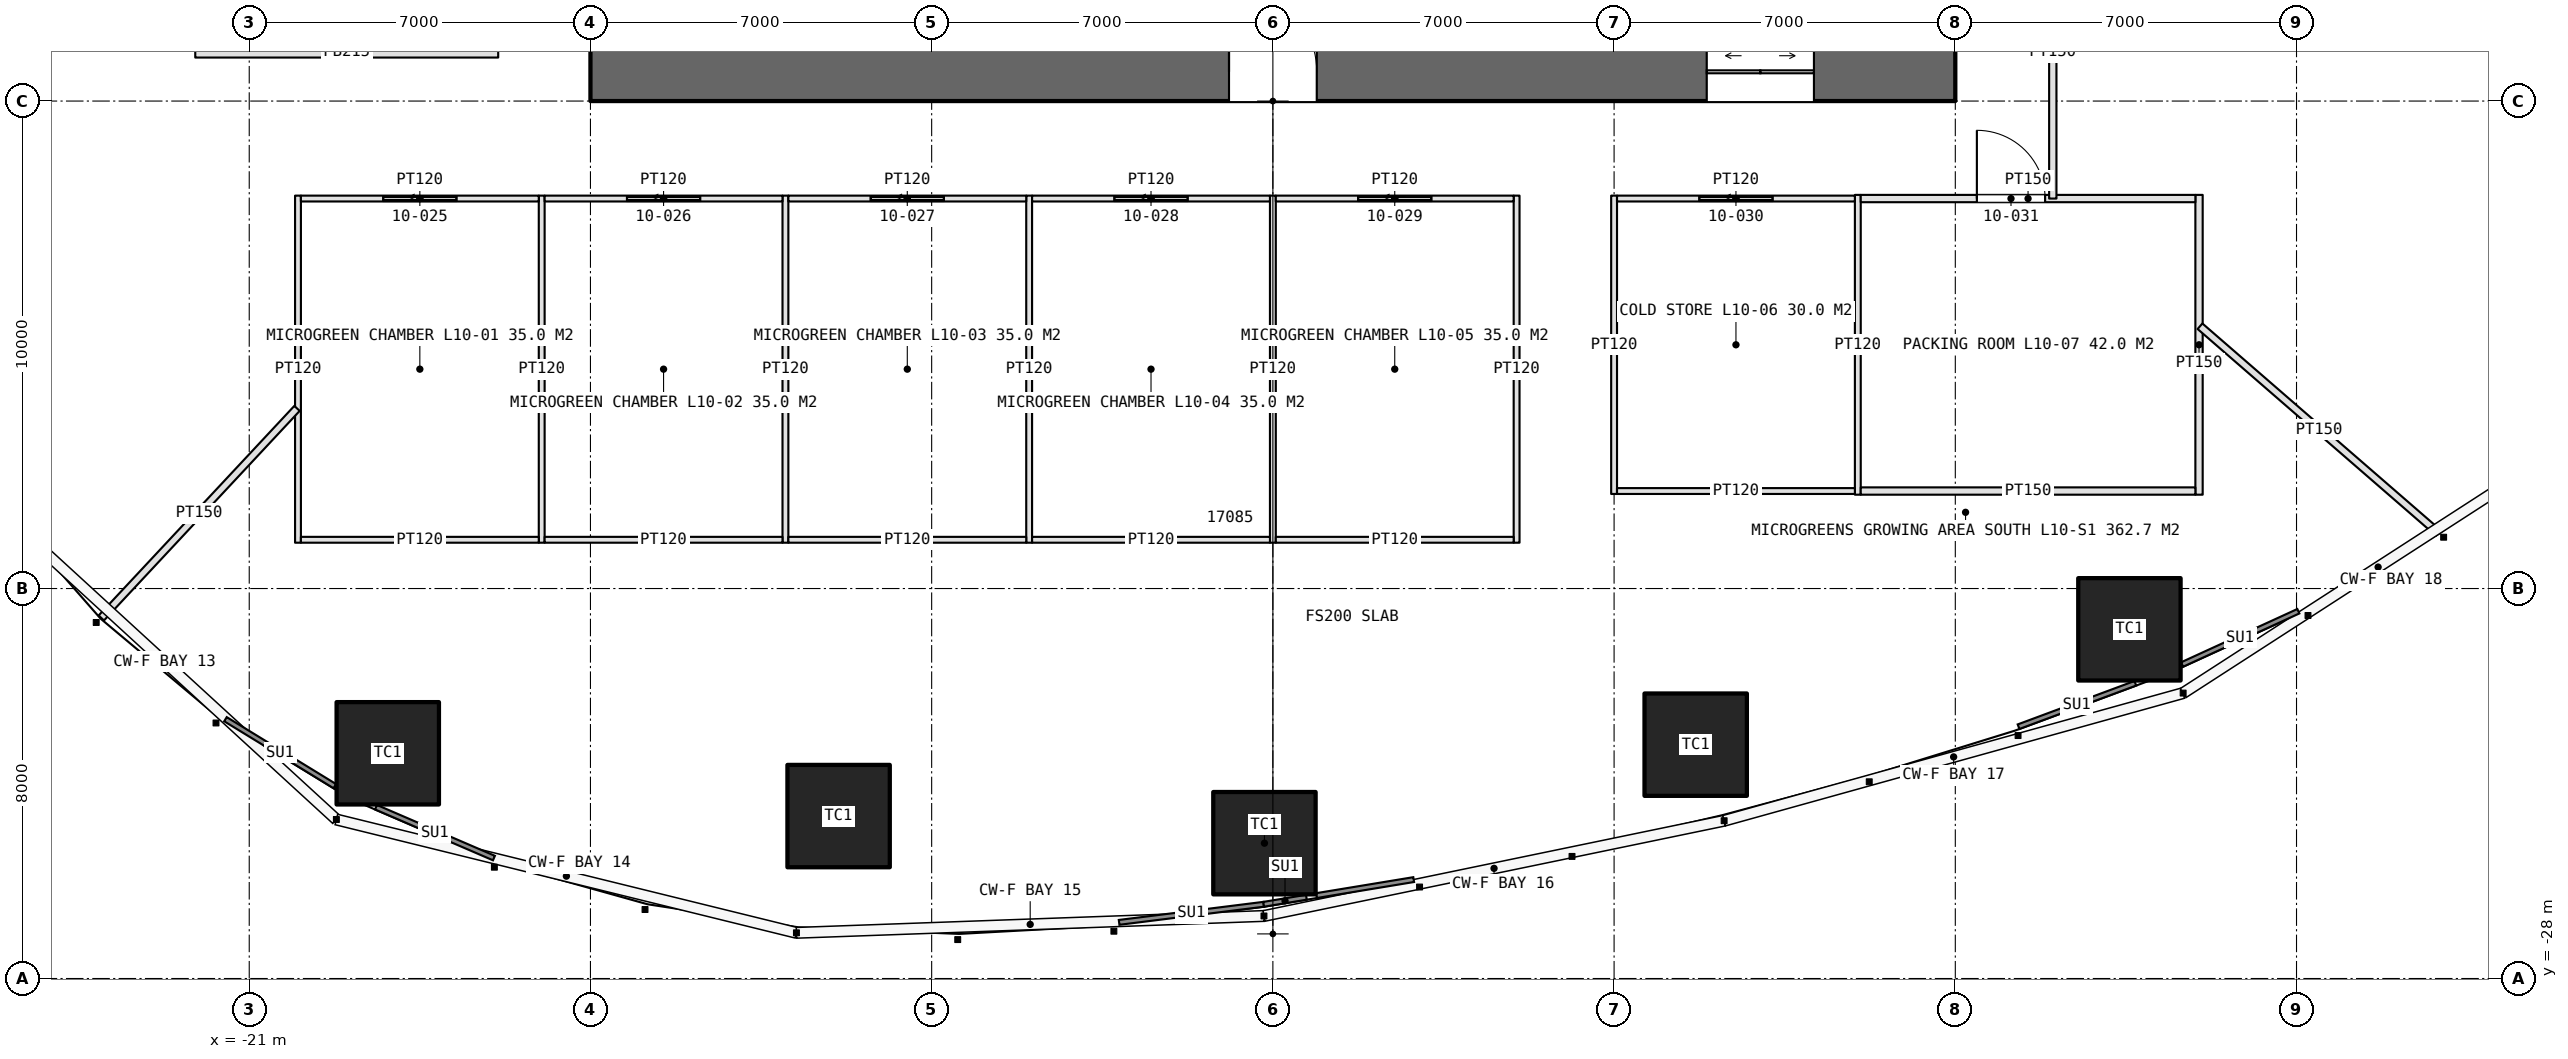
"""IFC4 building model, lengths in metres.
Left out: names, types, materials, properties, quantities, classifications, styles, units other than length and angle.
Written with IfcOpenShell. Run it as: python <this file> out.ifc"""

import sys

from ifc_helpers import new_model, si_unit, direction, frame, frame_2d, origin, origin_2d, place, context, subcontext, project, spatial, rectangle, extrude, element, fill, save


model = new_model("IFC4")
c1 = context("Model", 3, precision=1e-05, world=origin(), true_north=direction((0.0, 1.0)))
c2 = subcontext(c1, "Body", "Model", "MODEL_VIEW")
j1 = project(units=[si_unit("LENGTHUNIT", "METRE"), si_unit("PLANEANGLEUNIT", "RADIAN")], contexts=[c1])
p1 = place(None, origin())
s1 = spatial("IfcSite", under=j1, at=p1, CompositionType="ELEMENT")
p2 = place(p1, origin())
s2 = spatial("IfcBuilding", under=s1, at=p2, CompositionType="ELEMENT")
p3 = place(p2, frame((0.0, 0.0, 50.0)))
s3 = spatial("IfcBuildingStorey", under=s2, at=p3, CompositionType="ELEMENT", Elevation=50.0)
p4 = place(p3, frame((-14.0, -9.4, 0.0), z_axis=(0.0, 0.0, 1.0), x_axis=(1.0, 0.0, 0.0)))
e1 = element("IfcWall", 1, at=p4, inside=s3, PredefinedType="SHEAR", context=c2, shape_type="SweptSolid", body=[
    extrude(rectangle(XDim=28.0, YDim=1.2, at=frame_2d((14.0, 0.0))), origin(), (0.0, 0.0, 1.0), 5.0),
])
p5 = place(p4, frame((13.1, 0.0, 0.0)))
e2 = element("IfcOpeningElement", 2, at=p5, cuts=e1, PredefinedType="OPENING", context=c2, shape_type="SweptSolid", body=[
    extrude(rectangle(XDim=1.8, YDim=2.4, at=frame_2d((0.9, 1.2))), frame((0.0, 0.61, 0.0), z_axis=(0.0, -1.0, 0.0), x_axis=(1.0, 0.0, 0.0)), (0.0, 0.0, 1.0), 1.22),
])
p6 = place(p4, frame((22.9, 0.0, 0.0)))
e3 = element("IfcOpeningElement", 3, at=p6, cuts=e1, PredefinedType="OPENING", context=c2, shape_type="SweptSolid", body=[
    extrude(rectangle(XDim=2.2, YDim=2.7, at=frame_2d((1.1, 1.35))), frame((0.0, 0.61, 0.0), z_axis=(0.0, -1.0, 0.0), x_axis=(1.0, 0.0, 0.0)), (0.0, 0.0, 1.0), 1.22),
])
for number, where, z_axis, x_axis in (
    (4, (-18.158, -23.38, 0.0), (0.0, 0.0, 1.0), (1.0, 0.0, 0.0)),
    (5, (-8.909, -24.668, 0.0), (0.0, 0.0, 1.0), (1.0, 0.0, 0.0)),
    (6, (-0.173, -25.224, 0.0), (0.0, 0.0, 1.0), (1.0, 0.0, 0.0)),
    (7, (8.674, -23.203, 0.0), (0.0, 0.0, 1.0), (1.0, 0.0, 0.0)),
    (8, (17.572, -20.837, 0.0), (0.0, 0.0, 1.0), (1.0, 0.0, 0.0)),
):
    element("IfcColumn", number, at=place(p3, frame(where, z_axis=z_axis, x_axis=x_axis)), inside=s3, PredefinedType="COLUMN", context=c2, shape_type="SweptSolid", body=[
        extrude(rectangle(XDim=2.1, YDim=2.1, at=origin_2d()), origin(), (0.0, 0.0, 1.0), 5.0),
    ])
for number, where, z_axis, x_axis in (
    (9, (-20.0, -11.94, 0.0), (0.0, 0.0, 1.0), (0.0, -1.0, 0.0)),
    (10, (-15.0, -11.94, 0.0), (0.0, 0.0, 1.0), (0.0, -1.0, 0.0)),
    (11, (-10.0, -11.94, 0.0), (0.0, 0.0, 1.0), (0.0, -1.0, 0.0)),
    (12, (-5.0, -11.94, 0.0), (0.0, 0.0, 1.0), (0.0, -1.0, 0.0)),
    (13, (0.0, -11.94, 0.0), (0.0, 0.0, 1.0), (0.0, -1.0, 0.0)),
    (14, (5.0, -11.94, 0.0), (0.0, 0.0, 1.0), (0.0, -1.0, 0.0)),
):
    element("IfcWall", number, at=place(p3, frame(where, z_axis=z_axis, x_axis=x_axis)), inside=s3, PredefinedType="PARTITIONING", context=c2, shape_type="SweptSolid", body=[
        extrude(rectangle(XDim=7.12, YDim=0.12, at=frame_2d((3.56, 0.0))), origin(), (0.0, 0.0, 1.0), 3.6),
    ])
p7 = place(p3, frame((-19.94, -12.0, 0.0), z_axis=(0.0, 0.0, 1.0), x_axis=(1.0, 0.0, 0.0)))
e15 = element("IfcWall", 15, at=p7, inside=s3, PredefinedType="PARTITIONING", context=c2, shape_type="SweptSolid", body=[
    extrude(rectangle(XDim=4.88, YDim=0.12, at=frame_2d((2.44, 0.0))), origin(), (0.0, 0.0, 1.0), 3.6),
])
p8 = place(p7, frame((1.69, 0.0, 0.0)))
e16 = element("IfcOpeningElement", 16, at=p8, cuts=e15, PredefinedType="OPENING", context=c2, shape_type="SweptSolid", body=[
    extrude(rectangle(XDim=1.5, YDim=2.5, at=frame_2d((0.75, 1.25))), frame((0.0, 0.07, 0.0), z_axis=(0.0, -1.0, 0.0), x_axis=(1.0, 0.0, 0.0)), (0.0, 0.0, 1.0), 0.14),
])
p9 = place(p3, frame((-19.94, -19.0, 0.0), z_axis=(0.0, 0.0, 1.0), x_axis=(1.0, 0.0, 0.0)))
e17 = element("IfcWall", 17, at=p9, inside=s3, PredefinedType="PARTITIONING", context=c2, shape_type="SweptSolid", body=[
    extrude(rectangle(XDim=4.88, YDim=0.12, at=frame_2d((2.44, 0.0))), origin(), (0.0, 0.0, 1.0), 3.6),
])
p10 = place(p3, frame((-14.94, -12.0, 0.0), z_axis=(0.0, 0.0, 1.0), x_axis=(1.0, 0.0, 0.0)))
e18 = element("IfcWall", 18, at=p10, inside=s3, PredefinedType="PARTITIONING", context=c2, shape_type="SweptSolid", body=[
    extrude(rectangle(XDim=4.88, YDim=0.12, at=frame_2d((2.44, 0.0))), origin(), (0.0, 0.0, 1.0), 3.6),
])
p11 = place(p10, frame((1.69, 0.0, 0.0)))
e19 = element("IfcOpeningElement", 19, at=p11, cuts=e18, PredefinedType="OPENING", context=c2, shape_type="SweptSolid", body=[
    extrude(rectangle(XDim=1.5, YDim=2.5, at=frame_2d((0.75, 1.25))), frame((0.0, 0.07, 0.0), z_axis=(0.0, -1.0, 0.0), x_axis=(1.0, 0.0, 0.0)), (0.0, 0.0, 1.0), 0.14),
])
p12 = place(p3, frame((-14.94, -19.0, 0.0), z_axis=(0.0, 0.0, 1.0), x_axis=(1.0, 0.0, 0.0)))
e20 = element("IfcWall", 20, at=p12, inside=s3, PredefinedType="PARTITIONING", context=c2, shape_type="SweptSolid", body=[
    extrude(rectangle(XDim=4.88, YDim=0.12, at=frame_2d((2.44, 0.0))), origin(), (0.0, 0.0, 1.0), 3.6),
])
p13 = place(p3, frame((-9.94, -12.0, 0.0), z_axis=(0.0, 0.0, 1.0), x_axis=(1.0, 0.0, 0.0)))
e21 = element("IfcWall", 21, at=p13, inside=s3, PredefinedType="PARTITIONING", context=c2, shape_type="SweptSolid", body=[
    extrude(rectangle(XDim=4.88, YDim=0.12, at=frame_2d((2.44, 0.0))), origin(), (0.0, 0.0, 1.0), 3.6),
])
p14 = place(p13, frame((1.69, 0.0, 0.0)))
e22 = element("IfcOpeningElement", 22, at=p14, cuts=e21, PredefinedType="OPENING", context=c2, shape_type="SweptSolid", body=[
    extrude(rectangle(XDim=1.5, YDim=2.5, at=frame_2d((0.75, 1.25))), frame((0.0, 0.07, 0.0), z_axis=(0.0, -1.0, 0.0), x_axis=(1.0, 0.0, 0.0)), (0.0, 0.0, 1.0), 0.14),
])
p15 = place(p3, frame((-9.94, -19.0, 0.0), z_axis=(0.0, 0.0, 1.0), x_axis=(1.0, 0.0, 0.0)))
e23 = element("IfcWall", 23, at=p15, inside=s3, PredefinedType="PARTITIONING", context=c2, shape_type="SweptSolid", body=[
    extrude(rectangle(XDim=4.88, YDim=0.12, at=frame_2d((2.44, 0.0))), origin(), (0.0, 0.0, 1.0), 3.6),
])
p16 = place(p3, frame((-4.94, -12.0, 0.0), z_axis=(0.0, 0.0, 1.0), x_axis=(1.0, 0.0, 0.0)))
e24 = element("IfcWall", 24, at=p16, inside=s3, PredefinedType="PARTITIONING", context=c2, shape_type="SweptSolid", body=[
    extrude(rectangle(XDim=4.88, YDim=0.12, at=frame_2d((2.44, 0.0))), origin(), (0.0, 0.0, 1.0), 3.6),
])
p17 = place(p16, frame((1.69, 0.0, 0.0)))
e25 = element("IfcOpeningElement", 25, at=p17, cuts=e24, PredefinedType="OPENING", context=c2, shape_type="SweptSolid", body=[
    extrude(rectangle(XDim=1.5, YDim=2.5, at=frame_2d((0.75, 1.25))), frame((0.0, 0.07, 0.0), z_axis=(0.0, -1.0, 0.0), x_axis=(1.0, 0.0, 0.0)), (0.0, 0.0, 1.0), 0.14),
])
p18 = place(p3, frame((-4.94, -19.0, 0.0), z_axis=(0.0, 0.0, 1.0), x_axis=(1.0, 0.0, 0.0)))
e26 = element("IfcWall", 26, at=p18, inside=s3, PredefinedType="PARTITIONING", context=c2, shape_type="SweptSolid", body=[
    extrude(rectangle(XDim=4.88, YDim=0.12, at=frame_2d((2.44, 0.0))), origin(), (0.0, 0.0, 1.0), 3.6),
])
p19 = place(p3, frame((0.06, -12.0, 0.0), z_axis=(0.0, 0.0, 1.0), x_axis=(1.0, 0.0, 0.0)))
e27 = element("IfcWall", 27, at=p19, inside=s3, PredefinedType="PARTITIONING", context=c2, shape_type="SweptSolid", body=[
    extrude(rectangle(XDim=4.88, YDim=0.12, at=frame_2d((2.44, 0.0))), origin(), (0.0, 0.0, 1.0), 3.6),
])
p20 = place(p19, frame((1.69, 0.0, 0.0)))
e28 = element("IfcOpeningElement", 28, at=p20, cuts=e27, PredefinedType="OPENING", context=c2, shape_type="SweptSolid", body=[
    extrude(rectangle(XDim=1.5, YDim=2.5, at=frame_2d((0.75, 1.25))), frame((0.0, 0.07, 0.0), z_axis=(0.0, -1.0, 0.0), x_axis=(1.0, 0.0, 0.0)), (0.0, 0.0, 1.0), 0.14),
])
p21 = place(p3, frame((0.06, -19.0, 0.0), z_axis=(0.0, 0.0, 1.0), x_axis=(1.0, 0.0, 0.0)))
e29 = element("IfcWall", 29, at=p21, inside=s3, PredefinedType="PARTITIONING", context=c2, shape_type="SweptSolid", body=[
    extrude(rectangle(XDim=4.88, YDim=0.12, at=frame_2d((2.44, 0.0))), origin(), (0.0, 0.0, 1.0), 3.6),
])
p22 = place(p3, frame((7.0, -11.94, 0.0), z_axis=(0.0, 0.0, 1.0), x_axis=(0.0, -1.0, 0.0)))
e30 = element("IfcWall", 30, at=p22, inside=s3, PredefinedType="PARTITIONING", context=c2, shape_type="SweptSolid", body=[
    extrude(rectangle(XDim=6.12, YDim=0.12, at=frame_2d((3.06, 0.0))), origin(), (0.0, 0.0, 1.0), 3.6),
])
p23 = place(p3, frame((12.0, -11.925, 0.0), z_axis=(0.0, 0.0, 1.0), x_axis=(0.0, -1.0, 0.0)))
e31 = element("IfcWall", 31, at=p23, inside=s3, PredefinedType="PARTITIONING", context=c2, shape_type="SweptSolid", body=[
    extrude(rectangle(XDim=6.15, YDim=0.12, at=frame_2d((3.075, 0.0))), origin(), (0.0, 0.0, 1.0), 3.6),
])
p24 = place(p3, frame((19.0, -11.925, 0.0), z_axis=(0.0, 0.0, 1.0), x_axis=(0.0, -1.0, 0.0)))
e32 = element("IfcWall", 32, at=p24, inside=s3, PredefinedType="PARTITIONING", context=c2, shape_type="SweptSolid", body=[
    extrude(rectangle(XDim=6.15, YDim=0.15, at=frame_2d((3.075, 0.0))), origin(), (0.0, 0.0, 1.0), 3.6),
])
p25 = place(p3, frame((7.06, -12.0, 0.0), z_axis=(0.0, 0.0, 1.0), x_axis=(1.0, 0.0, 0.0)))
e33 = element("IfcWall", 33, at=p25, inside=s3, PredefinedType="PARTITIONING", context=c2, shape_type="SweptSolid", body=[
    extrude(rectangle(XDim=4.88, YDim=0.12, at=frame_2d((2.44, 0.0))), origin(), (0.0, 0.0, 1.0), 3.6),
])
p26 = place(p25, frame((1.69, 0.0, 0.0)))
e34 = element("IfcOpeningElement", 34, at=p26, cuts=e33, PredefinedType="OPENING", context=c2, shape_type="SweptSolid", body=[
    extrude(rectangle(XDim=1.5, YDim=2.5, at=frame_2d((0.75, 1.25))), frame((0.0, 0.07, 0.0), z_axis=(0.0, -1.0, 0.0), x_axis=(1.0, 0.0, 0.0)), (0.0, 0.0, 1.0), 0.14),
])
p27 = place(p3, frame((7.06, -18.0, 0.0), z_axis=(0.0, 0.0, 1.0), x_axis=(1.0, 0.0, 0.0)))
e35 = element("IfcWall", 35, at=p27, inside=s3, PredefinedType="PARTITIONING", context=c2, shape_type="SweptSolid", body=[
    extrude(rectangle(XDim=4.88, YDim=0.12, at=frame_2d((2.44, 0.0))), origin(), (0.0, 0.0, 1.0), 3.6),
])
p28 = place(p3, frame((12.06, -12.0, 0.0), z_axis=(0.0, 0.0, 1.0), x_axis=(1.0, 0.0, 0.0)))
e36 = element("IfcWall", 36, at=p28, inside=s3, PredefinedType="PARTITIONING", context=c2, shape_type="SweptSolid", body=[
    extrude(rectangle(XDim=6.865, YDim=0.15, at=frame_2d((3.433, 0.0))), origin(), (0.0, 0.0, 1.0), 3.6),
])
p29 = place(p28, frame((2.383, 0.0, 0.0)))
e37 = element("IfcOpeningElement", 37, at=p29, cuts=e36, PredefinedType="OPENING", context=c2, shape_type="SweptSolid", body=[
    extrude(rectangle(XDim=1.4, YDim=2.4, at=frame_2d((0.7, 1.2))), frame((0.0, 0.085, 0.0), z_axis=(0.0, -1.0, 0.0), x_axis=(1.0, 0.0, 0.0)), (0.0, 0.0, 1.0), 0.17),
])
p30 = place(p3, frame((12.06, -18.0, 0.0), z_axis=(0.0, 0.0, 1.0), x_axis=(1.0, 0.0, 0.0)))
e38 = element("IfcWall", 38, at=p30, inside=s3, PredefinedType="PARTITIONING", context=c2, shape_type="SweptSolid", body=[
    extrude(rectangle(XDim=6.865, YDim=0.15, at=frame_2d((3.433, 0.0))), origin(), (0.0, 0.0, 1.0), 3.6),
])
p31 = place(p3, frame((-15.893, -9.0, 0.0), z_axis=(0.0, 0.0, 1.0), x_axis=(-1.0, 0.0, 0.0)))
e39 = element("IfcWall", 39, at=p31, inside=s3, PredefinedType="PARTITIONING", context=c2, shape_type="SweptSolid", body=[
    extrude(rectangle(XDim=6.215, YDim=0.215, at=frame_2d((3.107, 0.0))), origin(), (0.0, 0.0, 1.0), 3.6),
])
p32 = place(p3, frame((-20.02, -16.305, 0.0), z_axis=(0.0, 0.0, 1.0), x_axis=(-0.682516386928, -0.730870290527, 0.0)))
e40 = element("IfcWall", 40, at=p32, inside=s3, PredefinedType="PARTITIONING", context=c2, shape_type="SweptSolid", body=[
    extrude(rectangle(XDim=5.882, YDim=0.15, at=frame_2d((2.941, 0.0))), origin(), (0.0, 0.0, 1.0), 3.6),
])
p33 = place(p3, frame((19.02, -14.619, 0.0), z_axis=(0.0, 0.0, 1.0), x_axis=(0.755435065004, -0.65522352107, 0.0)))
e41 = element("IfcWall", 41, at=p33, inside=s3, PredefinedType="PARTITIONING", context=c2, shape_type="SweptSolid", body=[
    extrude(rectangle(XDim=6.471, YDim=0.15, at=frame_2d((3.235, 0.0))), origin(), (0.0, 0.0, 1.0), 3.6),
])
p34 = place(p3, frame((16.0, -12.0, 0.0), z_axis=(0.0, 0.0, 1.0), x_axis=(0.0, 1.0, 0.0)))
e42 = element("IfcWall", 42, at=p34, inside=s3, PredefinedType="PARTITIONING", context=c2, shape_type="SweptSolid", body=[
    extrude(rectangle(XDim=6.0, YDim=0.15, at=frame_2d((3.0, 0.0))), origin(), (0.0, 0.0, 1.0), 3.6),
])
p35 = place(p34, frame((3.9, 0.0, 0.0)))
e43 = element("IfcOpeningElement", 43, at=p35, cuts=e42, PredefinedType="OPENING", context=c2, shape_type="SweptSolid", body=[
    extrude(rectangle(XDim=1.6, YDim=2.4, at=frame_2d((0.8, 1.2))), frame((0.0, 0.085, 0.0), z_axis=(0.0, -1.0, 0.0), x_axis=(1.0, 0.0, 0.0)), (0.0, 0.0, 1.0), 0.17),
])
p36 = place(p5, origin())
e44 = element("IfcDoor", 44, at=p36, inside=s3, OperationType="DOUBLE_DOOR_SINGLE_SWING", PredefinedType="DOOR", context=c2, shape_type="SweptSolid", body=[
    extrude(rectangle(XDim=1.8, YDim=2.4, at=frame_2d((0.9, 1.2))), frame((0.0, 0.025, 0.0), z_axis=(0.0, -1.0, 0.0), x_axis=(1.0, 0.0, 0.0)), (0.0, 0.0, 1.0), 0.05),
])
fill(e2, e44)
p37 = place(p6, origin())
e45 = element("IfcDoor", 45, at=p37, inside=s3, OperationType="DOUBLE_DOOR_SLIDING", PredefinedType="DOOR", context=c2, shape_type="SweptSolid", body=[
    extrude(rectangle(XDim=2.2, YDim=2.7, at=frame_2d((1.1, 1.35))), frame((0.0, 0.025, 0.0), z_axis=(0.0, -1.0, 0.0), x_axis=(1.0, 0.0, 0.0)), (0.0, 0.0, 1.0), 0.05),
])
fill(e3, e45)
p38 = place(p8, origin())
e46 = element("IfcDoor", 46, at=p38, inside=s3, OperationType="SLIDING_TO_LEFT", PredefinedType="DOOR", context=c2, shape_type="SweptSolid", body=[
    extrude(rectangle(XDim=1.5, YDim=2.5, at=frame_2d((0.75, 1.25))), frame((0.0, 0.025, 0.0), z_axis=(0.0, -1.0, 0.0), x_axis=(1.0, 0.0, 0.0)), (0.0, 0.0, 1.0), 0.05),
])
fill(e16, e46)
p39 = place(p11, origin())
e47 = element("IfcDoor", 47, at=p39, inside=s3, OperationType="SLIDING_TO_LEFT", PredefinedType="DOOR", context=c2, shape_type="SweptSolid", body=[
    extrude(rectangle(XDim=1.5, YDim=2.5, at=frame_2d((0.75, 1.25))), frame((0.0, 0.025, 0.0), z_axis=(0.0, -1.0, 0.0), x_axis=(1.0, 0.0, 0.0)), (0.0, 0.0, 1.0), 0.05),
])
fill(e19, e47)
p40 = place(p14, origin())
e48 = element("IfcDoor", 48, at=p40, inside=s3, OperationType="SLIDING_TO_LEFT", PredefinedType="DOOR", context=c2, shape_type="SweptSolid", body=[
    extrude(rectangle(XDim=1.5, YDim=2.5, at=frame_2d((0.75, 1.25))), frame((0.0, 0.025, 0.0), z_axis=(0.0, -1.0, 0.0), x_axis=(1.0, 0.0, 0.0)), (0.0, 0.0, 1.0), 0.05),
])
fill(e22, e48)
p41 = place(p17, origin())
e49 = element("IfcDoor", 49, at=p41, inside=s3, OperationType="SLIDING_TO_LEFT", PredefinedType="DOOR", context=c2, shape_type="SweptSolid", body=[
    extrude(rectangle(XDim=1.5, YDim=2.5, at=frame_2d((0.75, 1.25))), frame((0.0, 0.025, 0.0), z_axis=(0.0, -1.0, 0.0), x_axis=(1.0, 0.0, 0.0)), (0.0, 0.0, 1.0), 0.05),
])
fill(e25, e49)
p42 = place(p20, origin())
e50 = element("IfcDoor", 50, at=p42, inside=s3, OperationType="SLIDING_TO_LEFT", PredefinedType="DOOR", context=c2, shape_type="SweptSolid", body=[
    extrude(rectangle(XDim=1.5, YDim=2.5, at=frame_2d((0.75, 1.25))), frame((0.0, 0.025, 0.0), z_axis=(0.0, -1.0, 0.0), x_axis=(1.0, 0.0, 0.0)), (0.0, 0.0, 1.0), 0.05),
])
fill(e28, e50)
p43 = place(p26, origin())
e51 = element("IfcDoor", 51, at=p43, inside=s3, OperationType="SLIDING_TO_LEFT", PredefinedType="DOOR", context=c2, shape_type="SweptSolid", body=[
    extrude(rectangle(XDim=1.5, YDim=2.5, at=frame_2d((0.75, 1.25))), frame((0.0, 0.025, 0.0), z_axis=(0.0, -1.0, 0.0), x_axis=(1.0, 0.0, 0.0)), (0.0, 0.0, 1.0), 0.05),
])
fill(e34, e51)
p44 = place(p29, origin())
e52 = element("IfcDoor", 52, at=p44, inside=s3, OperationType="DOUBLE_DOOR_DOUBLE_SWING", PredefinedType="DOOR", context=c2, shape_type="SweptSolid", body=[
    extrude(rectangle(XDim=1.4, YDim=2.4, at=frame_2d((0.7, 1.2))), frame((0.0, 0.025, 0.0), z_axis=(0.0, -1.0, 0.0), x_axis=(1.0, 0.0, 0.0)), (0.0, 0.0, 1.0), 0.05),
])
fill(e37, e52)
save(model, sys.argv[1])
